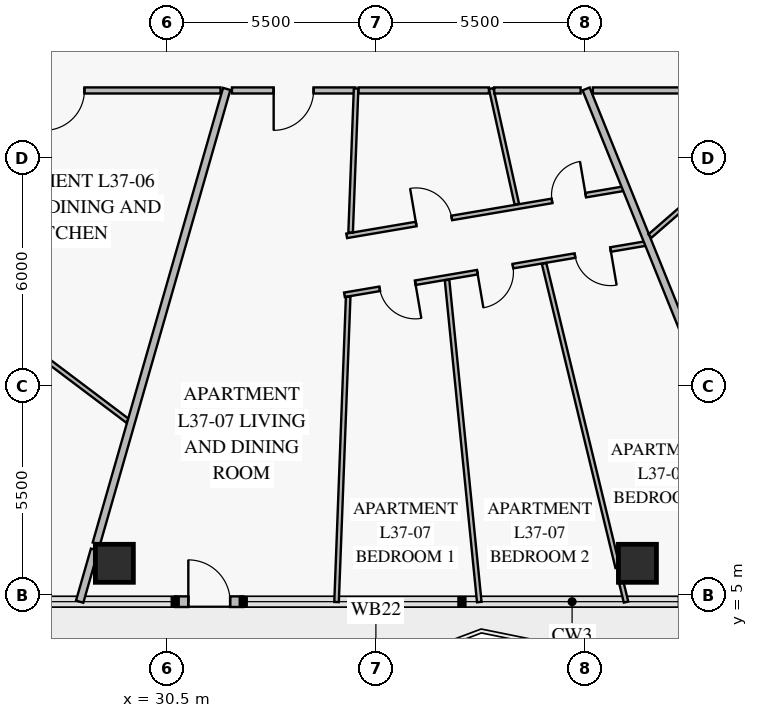
"""IFC4 building model, lengths in metres.
Left out: names, types, materials, properties, quantities, classifications, styles, units other than length and angle.
Written with IfcOpenShell. Run it as: python <this file> out.ifc"""

import sys

from ifc_helpers import new_model, si_unit, direction, frame, frame_2d, origin, origin_2d, place, context, subcontext, project, spatial, rectangle, extrude, element, fill, save


model = new_model("IFC4")
c1 = context("Model", 3, precision=1e-05, world=origin(), true_north=direction((0.0, 1.0)))
c2 = subcontext(c1, "Body", "Model", "MODEL_VIEW")
j1 = project(units=[si_unit("LENGTHUNIT", "METRE"), si_unit("PLANEANGLEUNIT", "RADIAN")], contexts=[c1])
p1 = place(None, origin())
s1 = spatial("IfcSite", under=j1, at=p1, CompositionType="ELEMENT")
p2 = place(p1, origin())
s2 = spatial("IfcBuilding", under=s1, at=p2, CompositionType="ELEMENT")
p3 = place(p2, frame((0.0, 0.0, 150.4)))
s3 = spatial("IfcBuildingStorey", under=s2, at=p3, CompositionType="ELEMENT", Elevation=150.4)
for number, where, z_axis, x_axis in (
    (1, (29.118, 5.827, 0.0), (0.0, 0.0, 1.0), (1.0, 0.0, 0.0)),
    (2, (42.882, 5.827, 0.0), (0.0, 0.0, 1.0), (1.0, 0.0, 0.0)),
):
    element("IfcColumn", number, at=place(p3, frame(where, z_axis=z_axis, x_axis=x_axis)), inside=s3, PredefinedType="COLUMN", context=c2, shape_type="SweptSolid", body=[
        extrude(rectangle(XDim=1.0, YDim=1.0, at=origin_2d()), origin(), (0.0, 0.0, 1.0), 3.55),
    ])
p4 = place(p3, frame((32.51, 4.817, 0.0), z_axis=(0.0, 0.0, 1.0), x_axis=(-1.0, 0.0, 0.0)))
e3 = element("IfcWall", 3, at=p4, inside=s3, PredefinedType="SOLIDWALL", context=c2, shape_type="SweptSolid", body=[
    extrude(rectangle(XDim=1.79, YDim=0.28, at=frame_2d((0.895, 0.0))), origin(), (0.0, 0.0, 1.0), 3.55),
])
p5 = place(p4, frame((0.345, 0.0, 0.0)))
e4 = element("IfcOpeningElement", 4, at=p5, cuts=e3, PredefinedType="OPENING", context=c2, shape_type="SweptSolid", body=[
    extrude(rectangle(XDim=1.1, YDim=2.2, at=frame_2d((0.55, 1.1))), frame((0.0, 0.152, 0.0), z_axis=(0.0, -1.0, 0.0), x_axis=(1.0, 0.0, 0.0)), (0.0, 0.0, 1.0), 0.304),
])
p6 = place(p3, frame((21.274, 15.749, 0.0), z_axis=(0.0, 0.0, 1.0), x_axis=(0.798637831458, -0.601811942524, 0.0)))
e5 = element("IfcWall", 5, at=p6, inside=s3, PredefinedType="PARTITIONING", context=c2, shape_type="SweptSolid", body=[
    extrude(rectangle(XDim=10.253, YDim=0.12, at=frame_2d((5.126, 0.0))), origin(), (0.0, 0.0, 1.0), 3.55),
])
p7 = place(p6, frame((1.277, 0.0, 0.0)))
e6 = element("IfcOpeningElement", 6, at=p7, cuts=e5, PredefinedType="OPENING", context=c2, shape_type="SweptSolid", body=[
    extrude(rectangle(XDim=0.95, YDim=2.1, at=frame_2d((0.475, 1.05))), frame((0.0, 0.072, 0.0), z_axis=(0.0, -1.0, 0.0), x_axis=(1.0, 0.0, 0.0)), (0.0, 0.0, 1.0), 0.144),
])
p8 = place(p6, frame((6.163, 0.0, 0.0)))
e7 = element("IfcOpeningElement", 7, at=p8, cuts=e5, PredefinedType="OPENING", context=c2, shape_type="SweptSolid", body=[
    extrude(rectangle(XDim=0.95, YDim=2.1, at=frame_2d((0.475, 1.05))), frame((0.0, 0.072, 0.0), z_axis=(0.0, -1.0, 0.0), x_axis=(1.0, 0.0, 0.0)), (0.0, 0.0, 1.0), 0.144),
])
p9 = place(p3, frame((23.699, 18.27, 0.0), z_axis=(0.0, 0.0, 1.0), x_axis=(1.0, 0.0, 0.0)))
e8 = element("IfcWall", 8, at=p9, inside=s3, PredefinedType="PARTITIONING", context=c2, shape_type="SweptSolid", body=[
    extrude(rectangle(XDim=8.213, YDim=0.16, at=frame_2d((4.106, 0.0))), origin(), (0.0, 0.0, 1.0), 3.55),
])
p10 = place(p9, frame((3.582, 0.0, 0.0)))
e9 = element("IfcOpeningElement", 9, at=p10, cuts=e8, PredefinedType="OPENING", context=c2, shape_type="SweptSolid", body=[
    extrude(rectangle(XDim=1.05, YDim=2.15, at=frame_2d((0.525, 1.075))), frame((0.0, 0.092, 0.0), z_axis=(0.0, -1.0, 0.0), x_axis=(1.0, 0.0, 0.0)), (0.0, 0.0, 1.0), 0.184),
])
p11 = place(p3, frame((35.232, 14.444, 0.0), z_axis=(0.0, 0.0, 1.0), x_axis=(0.985819661596, 0.167808208412, 0.0)))
e10 = element("IfcWall", 10, at=p11, inside=s3, PredefinedType="PARTITIONING", context=c2, shape_type="SweptSolid", body=[
    extrude(rectangle(XDim=7.407, YDim=0.12, at=frame_2d((3.703, 0.0))), origin(), (0.0, 0.0, 1.0), 2.9),
])
p12 = place(p11, frame((1.854, 0.0, 0.0)))
e11 = element("IfcOpeningElement", 11, at=p12, cuts=e10, PredefinedType="OPENING", context=c2, shape_type="SweptSolid", body=[
    extrude(rectangle(XDim=0.95, YDim=2.1, at=frame_2d((0.475, 1.05))), frame((0.0, 0.072, 0.0), z_axis=(0.0, -1.0, 0.0), x_axis=(1.0, 0.0, 0.0)), (0.0, 0.0, 1.0), 0.144),
])
p13 = place(p11, frame((5.48, 0.0, 0.0)))
e12 = element("IfcOpeningElement", 12, at=p13, cuts=e10, PredefinedType="OPENING", context=c2, shape_type="SweptSolid", body=[
    extrude(rectangle(XDim=0.9, YDim=2.1, at=frame_2d((0.45, 1.05))), frame((0.0, 0.072, 0.0), z_axis=(0.0, -1.0, 0.0), x_axis=(1.0, 0.0, 0.0)), (0.0, 0.0, 1.0), 0.144),
])
p14 = place(p3, frame((35.173, 12.892, 0.0), z_axis=(0.0, 0.0, 1.0), x_axis=(0.985819567417, 0.167808761684, 0.0)))
e13 = element("IfcWall", 13, at=p14, inside=s3, PredefinedType="PARTITIONING", context=c2, shape_type="SweptSolid", body=[
    extrude(rectangle(XDim=8.044, YDim=0.12, at=frame_2d((4.022, 0.0))), origin(), (0.0, 0.0, 1.0), 2.9),
])
p15 = place(p14, frame((0.941, 0.0, 0.0)))
e14 = element("IfcOpeningElement", 14, at=p15, cuts=e13, PredefinedType="OPENING", context=c2, shape_type="SweptSolid", body=[
    extrude(rectangle(XDim=0.95, YDim=2.1, at=frame_2d((0.475, 1.05))), frame((0.0, 0.072, 0.0), z_axis=(0.0, -1.0, 0.0), x_axis=(1.0, 0.0, 0.0)), (0.0, 0.0, 1.0), 0.144),
])
p16 = place(p14, frame((3.547, 0.0, 0.0)))
e15 = element("IfcOpeningElement", 15, at=p16, cuts=e13, PredefinedType="OPENING", context=c2, shape_type="SweptSolid", body=[
    extrude(rectangle(XDim=0.95, YDim=2.1, at=frame_2d((0.475, 1.05))), frame((0.0, 0.072, 0.0), z_axis=(0.0, -1.0, 0.0), x_axis=(1.0, 0.0, 0.0)), (0.0, 0.0, 1.0), 0.144),
])
p17 = place(p14, frame((6.153, 0.0, 0.0)))
e16 = element("IfcOpeningElement", 16, at=p17, cuts=e13, PredefinedType="OPENING", context=c2, shape_type="SweptSolid", body=[
    extrude(rectangle(XDim=0.95, YDim=2.1, at=frame_2d((0.475, 1.05))), frame((0.0, 0.072, 0.0), z_axis=(0.0, -1.0, 0.0), x_axis=(1.0, 0.0, 0.0)), (0.0, 0.0, 1.0), 0.144),
])
p18 = place(p3, frame((32.213, 18.27, 0.0), z_axis=(0.0, 0.0, 1.0), x_axis=(1.0, 0.0, 0.0)))
e17 = element("IfcWall", 17, at=p18, inside=s3, PredefinedType="PARTITIONING", context=c2, shape_type="SweptSolid", body=[
    extrude(rectangle(XDim=3.244, YDim=0.16, at=frame_2d((1.622, 0.0))), origin(), (0.0, 0.0, 1.0), 2.9),
])
p19 = place(p18, frame((1.097, 0.0, 0.0)))
e18 = element("IfcOpeningElement", 18, at=p19, cuts=e17, PredefinedType="OPENING", context=c2, shape_type="SweptSolid", body=[
    extrude(rectangle(XDim=1.05, YDim=2.15, at=frame_2d((0.525, 1.075))), frame((0.0, 0.092, 0.0), z_axis=(0.0, -1.0, 0.0), x_axis=(1.0, 0.0, 0.0)), (0.0, 0.0, 1.0), 0.184),
])
p20 = place(p3, frame((32.074, 18.31, 0.0), z_axis=(0.0, 0.0, 1.0), x_axis=(-0.275640788156, -0.961260711724, 0.0)))
e19 = element("IfcWall", 19, at=p20, inside=s3, PredefinedType="PARTITIONING", context=c2, shape_type="SweptSolid", body=[
    extrude(rectangle(XDim=12.445, YDim=0.2, at=frame_2d((6.223, 0.0))), origin(), (0.0, 0.0, 1.0), 3.55),
])
p21 = place(p3, frame((28.598, 6.186, 0.0), z_axis=(0.0, 0.0, 1.0), x_axis=(-0.275581158173, -0.961277808576, 0.0)))
e20 = element("IfcWall", 20, at=p21, inside=s3, PredefinedType="PARTITIONING", context=c2, shape_type="SweptSolid", body=[
    extrude(rectangle(XDim=1.425, YDim=0.2, at=frame_2d((0.712, 0.0))), origin(), (0.0, 0.0, 1.0), 2.87),
])
p22 = place(p3, frame((39.033, 18.32, 0.0), z_axis=(0.0, 0.0, 1.0), x_axis=(0.216516027093, -0.976279063594, 0.0)))
e21 = element("IfcWall", 21, at=p22, inside=s3, PredefinedType="PARTITIONING", context=c2, shape_type="SweptSolid", body=[
    extrude(rectangle(XDim=3.119, YDim=0.12, at=frame_2d((1.56, 0.0))), origin(), (0.0, 0.0, 1.0), 3.55),
])
p23 = place(p3, frame((37.873, 13.283, 0.0), z_axis=(0.0, 0.0, 1.0), x_axis=(0.099568986872, -0.995030661263, 0.0)))
e22 = element("IfcWall", 22, at=p23, inside=s3, PredefinedType="PARTITIONING", context=c2, shape_type="SweptSolid", body=[
    extrude(rectangle(XDim=8.518, YDim=0.12, at=frame_2d((4.259, 0.0))), origin(), (0.0, 0.0, 1.0), 2.87),
])
p24 = place(p3, frame((40.425, 13.717, 0.0), z_axis=(0.0, 0.0, 1.0), x_axis=(0.235264736648, -0.971931326633, 0.0)))
e23 = element("IfcWall", 23, at=p24, inside=s3, PredefinedType="PARTITIONING", context=c2, shape_type="SweptSolid", body=[
    extrude(rectangle(XDim=8.232, YDim=0.12, at=frame_2d((4.116, 0.0))), origin(), (0.0, 0.0, 1.0), 2.87),
])
p25 = place(p3, frame((42.461, 5.307, 0.0), z_axis=(0.0, 0.0, 1.0), x_axis=(0.23538270084, -0.971902764759, 0.0)))
e24 = element("IfcWall", 24, at=p25, inside=s3, PredefinedType="PARTITIONING", context=c2, shape_type="SweptSolid", body=[
    extrude(rectangle(XDim=0.514, YDim=0.12, at=frame_2d((0.257, 0.0))), origin(), (0.0, 0.0, 1.0), 3.55),
])
p26 = place(p3, frame((35.479, 18.32, 0.0), z_axis=(0.0, 0.0, 1.0), x_axis=(-0.03804986936, -0.999275841518, 0.0)))
e25 = element("IfcWall", 25, at=p26, inside=s3, PredefinedType="PARTITIONING", context=c2, shape_type="SweptSolid", body=[
    extrude(rectangle(XDim=3.792, YDim=0.12, at=frame_2d((1.896, 0.0))), origin(), (0.0, 0.0, 1.0), 3.55),
])
p27 = place(p3, frame((35.271, 12.84, 0.0), z_axis=(0.0, 0.0, 1.0), x_axis=(-0.038054050692, -0.999275682295, 0.0)))
e26 = element("IfcWall", 26, at=p27, inside=s3, PredefinedType="PARTITIONING", context=c2, shape_type="SweptSolid", body=[
    extrude(rectangle(XDim=8.039, YDim=0.12, at=frame_2d((4.02, 0.0))), origin(), (0.0, 0.0, 1.0), 2.87),
])
p28 = place(p3, frame((41.531, 18.31, 0.0), z_axis=(0.0, 0.0, 1.0), x_axis=(0.374610610646, -0.92718223149, 0.0)))
e27 = element("IfcWall", 27, at=p28, inside=s3, PredefinedType="PARTITIONING", context=c2, shape_type="SweptSolid", body=[
    extrude(rectangle(XDim=14.553, YDim=0.2, at=frame_2d((7.276, 0.0))), origin(), (0.0, 0.0, 1.0), 2.87),
])
p29 = place(p3, frame((43.212, 14.439, 0.0), z_axis=(0.0, 0.0, 1.0), x_axis=(0.754711017703, 0.656057375355, 0.0)))
e28 = element("IfcWall", 28, at=p29, inside=s3, PredefinedType="PARTITIONING", context=c2, shape_type="SweptSolid", body=[
    extrude(rectangle(XDim=3.438, YDim=0.12, at=frame_2d((1.719, 0.0))), origin(), (0.0, 0.0, 1.0), 3.55),
])
p30 = place(p3, frame((35.545, 18.27, 0.0), z_axis=(0.0, 0.0, 1.0), x_axis=(1.0, 0.0, 0.0)))
e29 = element("IfcWall", 29, at=p30, inside=s3, PredefinedType="PARTITIONING", context=c2, shape_type="SweptSolid", body=[
    extrude(rectangle(XDim=3.429, YDim=0.16, at=frame_2d((1.715, 0.0))), origin(), (0.0, 0.0, 1.0), 3.55),
])
p31 = place(p3, frame((39.114, 18.27, 0.0), z_axis=(0.0, 0.0, 1.0), x_axis=(1.0, 0.0, 0.0)))
e30 = element("IfcWall", 30, at=p31, inside=s3, PredefinedType="PARTITIONING", context=c2, shape_type="SweptSolid", body=[
    extrude(rectangle(XDim=2.273, YDim=0.16, at=frame_2d((1.136, 0.0))), origin(), (0.0, 0.0, 1.0), 2.9),
])
p32 = place(p3, frame((41.709, 18.27, 0.0), z_axis=(0.0, 0.0, 1.0), x_axis=(1.0, 0.0, 0.0)))
e31 = element("IfcWall", 31, at=p32, inside=s3, PredefinedType="PARTITIONING", context=c2, shape_type="SweptSolid", body=[
    extrude(rectangle(XDim=3.136, YDim=0.16, at=frame_2d((1.568, 0.0))), origin(), (0.0, 0.0, 1.0), 3.55),
])
p33 = place(p5, frame((1.1, 0.0, 0.0), z_axis=(0.0, 0.0, 1.0), x_axis=(-1.0, 0.0, 0.0)))
e32 = element("IfcDoor", 32, at=p33, inside=s3, OperationType="SINGLE_SWING_LEFT", PredefinedType="DOOR", context=c2, shape_type="SweptSolid", body=[
    extrude(rectangle(XDim=1.1, YDim=2.2, at=frame_2d((0.55, 1.1))), frame((0.0, 0.025, 0.0), z_axis=(0.0, -1.0, 0.0), x_axis=(1.0, 0.0, 0.0)), (0.0, 0.0, 1.0), 0.05),
])
fill(e4, e32)
p34 = place(p10, frame((1.05, 0.0, 0.0), z_axis=(0.0, 0.0, 1.0), x_axis=(-1.0, 0.0, 0.0)))
e33 = element("IfcDoor", 33, at=p34, inside=s3, OperationType="SINGLE_SWING_RIGHT", PredefinedType="DOOR", context=c2, shape_type="SweptSolid", body=[
    extrude(rectangle(XDim=1.05, YDim=2.15, at=frame_2d((0.525, 1.075))), frame((0.0, 0.025, 0.0), z_axis=(0.0, -1.0, 0.0), x_axis=(1.0, 0.0, 0.0)), (0.0, 0.0, 1.0), 0.05),
])
fill(e9, e33)
p35 = place(p12, origin())
e34 = element("IfcDoor", 34, at=p35, inside=s3, OperationType="SINGLE_SWING_LEFT", PredefinedType="DOOR", context=c2, shape_type="SweptSolid", body=[
    extrude(rectangle(XDim=0.95, YDim=2.1, at=frame_2d((0.475, 1.05))), frame((0.0, 0.025, 0.0), z_axis=(0.0, -1.0, 0.0), x_axis=(1.0, 0.0, 0.0)), (0.0, 0.0, 1.0), 0.05),
])
fill(e11, e34)
p36 = place(p13, origin())
e35 = element("IfcDoor", 35, at=p36, inside=s3, OperationType="SINGLE_SWING_RIGHT", PredefinedType="DOOR", context=c2, shape_type="SweptSolid", body=[
    extrude(rectangle(XDim=0.9, YDim=2.1, at=frame_2d((0.45, 1.05))), frame((0.0, 0.025, 0.0), z_axis=(0.0, -1.0, 0.0), x_axis=(1.0, 0.0, 0.0)), (0.0, 0.0, 1.0), 0.05),
])
fill(e12, e35)
p37 = place(p15, frame((0.95, 0.0, 0.0), z_axis=(0.0, 0.0, 1.0), x_axis=(-1.0, 0.0, 0.0)))
e36 = element("IfcDoor", 36, at=p37, inside=s3, OperationType="SINGLE_SWING_LEFT", PredefinedType="DOOR", context=c2, shape_type="SweptSolid", body=[
    extrude(rectangle(XDim=0.95, YDim=2.1, at=frame_2d((0.475, 1.05))), frame((0.0, 0.025, 0.0), z_axis=(0.0, -1.0, 0.0), x_axis=(1.0, 0.0, 0.0)), (0.0, 0.0, 1.0), 0.05),
])
fill(e14, e36)
p38 = place(p16, frame((0.95, 0.0, 0.0), z_axis=(0.0, 0.0, 1.0), x_axis=(-1.0, 0.0, 0.0)))
e37 = element("IfcDoor", 37, at=p38, inside=s3, OperationType="SINGLE_SWING_RIGHT", PredefinedType="DOOR", context=c2, shape_type="SweptSolid", body=[
    extrude(rectangle(XDim=0.95, YDim=2.1, at=frame_2d((0.475, 1.05))), frame((0.0, 0.025, 0.0), z_axis=(0.0, -1.0, 0.0), x_axis=(1.0, 0.0, 0.0)), (0.0, 0.0, 1.0), 0.05),
])
fill(e15, e37)
p39 = place(p17, frame((0.95, 0.0, 0.0), z_axis=(0.0, 0.0, 1.0), x_axis=(-1.0, 0.0, 0.0)))
e38 = element("IfcDoor", 38, at=p39, inside=s3, OperationType="SINGLE_SWING_LEFT", PredefinedType="DOOR", context=c2, shape_type="SweptSolid", body=[
    extrude(rectangle(XDim=0.95, YDim=2.1, at=frame_2d((0.475, 1.05))), frame((0.0, 0.025, 0.0), z_axis=(0.0, -1.0, 0.0), x_axis=(1.0, 0.0, 0.0)), (0.0, 0.0, 1.0), 0.05),
])
fill(e16, e38)
p40 = place(p19, frame((1.05, 0.0, 0.0), z_axis=(0.0, 0.0, 1.0), x_axis=(-1.0, 0.0, 0.0)))
e39 = element("IfcDoor", 39, at=p40, inside=s3, OperationType="SINGLE_SWING_RIGHT", PredefinedType="DOOR", context=c2, shape_type="SweptSolid", body=[
    extrude(rectangle(XDim=1.05, YDim=2.15, at=frame_2d((0.525, 1.075))), frame((0.0, 0.025, 0.0), z_axis=(0.0, -1.0, 0.0), x_axis=(1.0, 0.0, 0.0)), (0.0, 0.0, 1.0), 0.05),
])
fill(e18, e39)
save(model, sys.argv[1])
